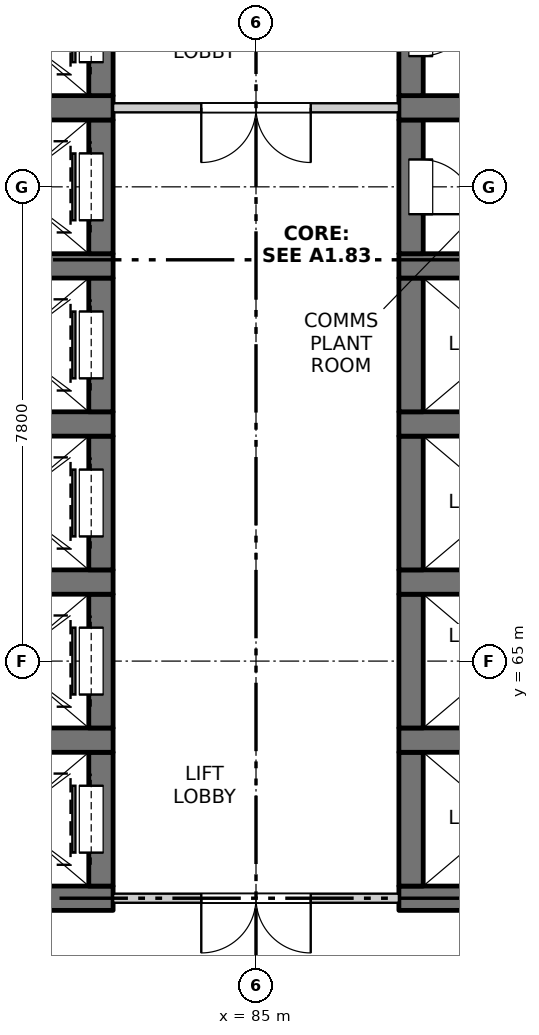
"""IFC4 building model, lengths in metres.
Left out: names, types, materials, properties, quantities, classifications, styles, units other than length and angle.
Written with IfcOpenShell. Run it as: python <this file> out.ifc"""

import sys

from ifc_helpers import new_model, si_unit, direction, frame, frame_2d, origin, place, context, subcontext, project, spatial, rectangle, extrude, element, fill, save


model = new_model("IFC4")
c1 = context("Model", 3, precision=1e-05, world=origin(), true_north=direction((0.0, 1.0)))
c2 = subcontext(c1, "Body", "Model", "MODEL_VIEW")
j1 = project(units=[si_unit("LENGTHUNIT", "METRE"), si_unit("PLANEANGLEUNIT", "RADIAN")], contexts=[c1])
p1 = place(None, origin())
s1 = spatial("IfcSite", under=j1, at=p1, CompositionType="ELEMENT")
p2 = place(p1, origin())
s2 = spatial("IfcBuilding", under=s1, at=p2, CompositionType="ELEMENT")
p3 = place(p2, frame((0.0, 0.0, 95.4)))
s3 = spatial("IfcBuildingStorey", under=s2, at=p3, CompositionType="ELEMENT", Elevation=95.4)
p4 = place(p3, frame((79.65, 61.1, -0.3), z_axis=(0.0, 0.0, 1.0), x_axis=(1.0, 0.0, 0.0)))
e1 = element("IfcWall", 1, at=p4, inside=s3, PredefinedType="SOLIDWALL", context=c2, shape_type="SweptSolid", body=[
    extrude(rectangle(XDim=3.0, YDim=0.4, at=frame_2d((1.5, 0.0))), origin(), (0.0, 0.0, 1.0), 4.5),
])
p5 = place(p3, frame((82.45, 61.3, -0.3), z_axis=(0.0, 0.0, 1.0), x_axis=(0.0, 1.0, 0.0)))
e2 = element("IfcWall", 2, at=p5, inside=s3, PredefinedType="SOLIDWALL", context=c2, shape_type="SweptSolid", body=[
    extrude(rectangle(XDim=2.2, YDim=0.4, at=frame_2d((1.1, 0.0))), origin(), (0.0, 0.0, 1.0), 4.5),
])
p6 = place(p5, frame((0.55, 0.0, 0.3)))
e3 = element("IfcOpeningElement", 3, at=p6, cuts=e2, PredefinedType="OPENING", context=c2, shape_type="SweptSolid", body=[
    extrude(rectangle(XDim=1.1, YDim=2.1, at=frame_2d((0.55, 1.05))), frame((0.0, 0.21, 0.0), z_axis=(0.0, -1.0, 0.0), x_axis=(1.0, 0.0, 0.0)), (0.0, 0.0, 1.0), 0.42),
])
p7 = place(p3, frame((79.65, 63.7, -0.3), z_axis=(0.0, 0.0, 1.0), x_axis=(1.0, 0.0, 0.0)))
e4 = element("IfcWall", 4, at=p7, inside=s3, PredefinedType="SOLIDWALL", context=c2, shape_type="SweptSolid", body=[
    extrude(rectangle(XDim=3.0, YDim=0.4, at=frame_2d((1.5, 0.0))), origin(), (0.0, 0.0, 1.0), 4.5),
])
p8 = place(p3, frame((82.45, 63.9, -0.3), z_axis=(0.0, 0.0, 1.0), x_axis=(0.0, 1.0, 0.0)))
e5 = element("IfcWall", 5, at=p8, inside=s3, PredefinedType="SOLIDWALL", context=c2, shape_type="SweptSolid", body=[
    extrude(rectangle(XDim=2.2, YDim=0.4, at=frame_2d((1.1, 0.0))), origin(), (0.0, 0.0, 1.0), 4.5),
])
p9 = place(p8, frame((0.55, 0.0, 0.3)))
e6 = element("IfcOpeningElement", 6, at=p9, cuts=e5, PredefinedType="OPENING", context=c2, shape_type="SweptSolid", body=[
    extrude(rectangle(XDim=1.1, YDim=2.1, at=frame_2d((0.55, 1.05))), frame((0.0, 0.21, 0.0), z_axis=(0.0, -1.0, 0.0), x_axis=(1.0, 0.0, 0.0)), (0.0, 0.0, 1.0), 0.42),
])
p10 = place(p3, frame((79.65, 66.3, -0.3), z_axis=(0.0, 0.0, 1.0), x_axis=(1.0, 0.0, 0.0)))
e7 = element("IfcWall", 7, at=p10, inside=s3, PredefinedType="SOLIDWALL", context=c2, shape_type="SweptSolid", body=[
    extrude(rectangle(XDim=3.0, YDim=0.4, at=frame_2d((1.5, 0.0))), origin(), (0.0, 0.0, 1.0), 4.5),
])
p11 = place(p3, frame((82.45, 66.5, -0.3), z_axis=(0.0, 0.0, 1.0), x_axis=(0.0, 1.0, 0.0)))
e8 = element("IfcWall", 8, at=p11, inside=s3, PredefinedType="SOLIDWALL", context=c2, shape_type="SweptSolid", body=[
    extrude(rectangle(XDim=2.2, YDim=0.4, at=frame_2d((1.1, 0.0))), origin(), (0.0, 0.0, 1.0), 4.5),
])
p12 = place(p11, frame((0.55, 0.0, 0.3)))
e9 = element("IfcOpeningElement", 9, at=p12, cuts=e8, PredefinedType="OPENING", context=c2, shape_type="SweptSolid", body=[
    extrude(rectangle(XDim=1.1, YDim=2.1, at=frame_2d((0.55, 1.05))), frame((0.0, 0.21, 0.0), z_axis=(0.0, -1.0, 0.0), x_axis=(1.0, 0.0, 0.0)), (0.0, 0.0, 1.0), 0.42),
])
p13 = place(p3, frame((79.65, 68.9, -0.3), z_axis=(0.0, 0.0, 1.0), x_axis=(1.0, 0.0, 0.0)))
e10 = element("IfcWall", 10, at=p13, inside=s3, PredefinedType="SOLIDWALL", context=c2, shape_type="SweptSolid", body=[
    extrude(rectangle(XDim=3.0, YDim=0.4, at=frame_2d((1.5, 0.0))), origin(), (0.0, 0.0, 1.0), 4.5),
])
p14 = place(p3, frame((82.45, 69.1, -0.3), z_axis=(0.0, 0.0, 1.0), x_axis=(0.0, 1.0, 0.0)))
e11 = element("IfcWall", 11, at=p14, inside=s3, PredefinedType="SOLIDWALL", context=c2, shape_type="SweptSolid", body=[
    extrude(rectangle(XDim=2.2, YDim=0.4, at=frame_2d((1.1, 0.0))), origin(), (0.0, 0.0, 1.0), 4.5),
])
p15 = place(p14, frame((0.55, 0.0, 0.3)))
e12 = element("IfcOpeningElement", 12, at=p15, cuts=e11, PredefinedType="OPENING", context=c2, shape_type="SweptSolid", body=[
    extrude(rectangle(XDim=1.1, YDim=2.1, at=frame_2d((0.55, 1.05))), frame((0.0, 0.21, 0.0), z_axis=(0.0, -1.0, 0.0), x_axis=(1.0, 0.0, 0.0)), (0.0, 0.0, 1.0), 0.42),
])
p16 = place(p3, frame((79.65, 71.5, -0.3), z_axis=(0.0, 0.0, 1.0), x_axis=(1.0, 0.0, 0.0)))
e13 = element("IfcWall", 13, at=p16, inside=s3, PredefinedType="SOLIDWALL", context=c2, shape_type="SweptSolid", body=[
    extrude(rectangle(XDim=3.0, YDim=0.4, at=frame_2d((1.5, 0.0))), origin(), (0.0, 0.0, 1.0), 4.5),
])
p17 = place(p3, frame((82.45, 71.7, -0.3), z_axis=(0.0, 0.0, 1.0), x_axis=(0.0, 1.0, 0.0)))
e14 = element("IfcWall", 14, at=p17, inside=s3, PredefinedType="SOLIDWALL", context=c2, shape_type="SweptSolid", body=[
    extrude(rectangle(XDim=2.2, YDim=0.4, at=frame_2d((1.1, 0.0))), origin(), (0.0, 0.0, 1.0), 4.5),
])
p18 = place(p17, frame((0.55, 0.0, 0.3)))
e15 = element("IfcOpeningElement", 15, at=p18, cuts=e14, PredefinedType="OPENING", context=c2, shape_type="SweptSolid", body=[
    extrude(rectangle(XDim=1.1, YDim=2.1, at=frame_2d((0.55, 1.05))), frame((0.0, 0.21, 0.0), z_axis=(0.0, -1.0, 0.0), x_axis=(1.0, 0.0, 0.0)), (0.0, 0.0, 1.0), 0.42),
])
p19 = place(p3, frame((79.65, 74.1, -0.3), z_axis=(0.0, 0.0, 1.0), x_axis=(1.0, 0.0, 0.0)))
e16 = element("IfcWall", 16, at=p19, inside=s3, PredefinedType="SOLIDWALL", context=c2, shape_type="SweptSolid", body=[
    extrude(rectangle(XDim=3.0, YDim=0.4, at=frame_2d((1.5, 0.0))), origin(), (0.0, 0.0, 1.0), 4.5),
])
p20 = place(p3, frame((82.45, 74.3, -0.3), z_axis=(0.0, 0.0, 1.0), x_axis=(0.0, 1.0, 0.0)))
e17 = element("IfcWall", 17, at=p20, inside=s3, PredefinedType="SOLIDWALL", context=c2, shape_type="SweptSolid", body=[
    extrude(rectangle(XDim=2.2, YDim=0.4, at=frame_2d((1.1, 0.0))), origin(), (0.0, 0.0, 1.0), 4.5),
])
p21 = place(p20, frame((0.55, 0.0, 0.3)))
e18 = element("IfcOpeningElement", 18, at=p21, cuts=e17, PredefinedType="OPENING", context=c2, shape_type="SweptSolid", body=[
    extrude(rectangle(XDim=1.1, YDim=2.1, at=frame_2d((0.55, 1.05))), frame((0.0, 0.21, 0.0), z_axis=(0.0, -1.0, 0.0), x_axis=(1.0, 0.0, 0.0)), (0.0, 0.0, 1.0), 0.42),
])
p22 = place(p3, frame((87.35, 61.1, -0.3), z_axis=(0.0, 0.0, 1.0), x_axis=(1.0, 0.0, 0.0)))
e19 = element("IfcWall", 19, at=p22, inside=s3, PredefinedType="SOLIDWALL", context=c2, shape_type="SweptSolid", body=[
    extrude(rectangle(XDim=3.0, YDim=0.4, at=frame_2d((1.5, 0.0))), origin(), (0.0, 0.0, 1.0), 4.5),
])
p23 = place(p3, frame((87.55, 61.3, -0.3), z_axis=(0.0, 0.0, 1.0), x_axis=(0.0, 1.0, 0.0)))
e20 = element("IfcWall", 20, at=p23, inside=s3, PredefinedType="SOLIDWALL", context=c2, shape_type="SweptSolid", body=[
    extrude(rectangle(XDim=2.2, YDim=0.4, at=frame_2d((1.1, 0.0))), origin(), (0.0, 0.0, 1.0), 4.5),
])
p24 = place(p3, frame((87.35, 63.7, -0.3), z_axis=(0.0, 0.0, 1.0), x_axis=(1.0, 0.0, 0.0)))
e21 = element("IfcWall", 21, at=p24, inside=s3, PredefinedType="SOLIDWALL", context=c2, shape_type="SweptSolid", body=[
    extrude(rectangle(XDim=3.0, YDim=0.4, at=frame_2d((1.5, 0.0))), origin(), (0.0, 0.0, 1.0), 4.5),
])
p25 = place(p3, frame((87.55, 63.9, -0.3), z_axis=(0.0, 0.0, 1.0), x_axis=(0.0, 1.0, 0.0)))
e22 = element("IfcWall", 22, at=p25, inside=s3, PredefinedType="SOLIDWALL", context=c2, shape_type="SweptSolid", body=[
    extrude(rectangle(XDim=2.2, YDim=0.4, at=frame_2d((1.1, 0.0))), origin(), (0.0, 0.0, 1.0), 4.5),
])
p26 = place(p3, frame((87.35, 66.3, -0.3), z_axis=(0.0, 0.0, 1.0), x_axis=(1.0, 0.0, 0.0)))
e23 = element("IfcWall", 23, at=p26, inside=s3, PredefinedType="SOLIDWALL", context=c2, shape_type="SweptSolid", body=[
    extrude(rectangle(XDim=3.0, YDim=0.4, at=frame_2d((1.5, 0.0))), origin(), (0.0, 0.0, 1.0), 4.5),
])
p27 = place(p3, frame((87.55, 66.5, -0.3), z_axis=(0.0, 0.0, 1.0), x_axis=(0.0, 1.0, 0.0)))
e24 = element("IfcWall", 24, at=p27, inside=s3, PredefinedType="SOLIDWALL", context=c2, shape_type="SweptSolid", body=[
    extrude(rectangle(XDim=2.2, YDim=0.4, at=frame_2d((1.1, 0.0))), origin(), (0.0, 0.0, 1.0), 4.5),
])
p28 = place(p3, frame((87.35, 68.9, -0.3), z_axis=(0.0, 0.0, 1.0), x_axis=(1.0, 0.0, 0.0)))
e25 = element("IfcWall", 25, at=p28, inside=s3, PredefinedType="SOLIDWALL", context=c2, shape_type="SweptSolid", body=[
    extrude(rectangle(XDim=3.0, YDim=0.4, at=frame_2d((1.5, 0.0))), origin(), (0.0, 0.0, 1.0), 4.5),
])
p29 = place(p3, frame((87.55, 69.1, -0.3), z_axis=(0.0, 0.0, 1.0), x_axis=(0.0, 1.0, 0.0)))
e26 = element("IfcWall", 26, at=p29, inside=s3, PredefinedType="SOLIDWALL", context=c2, shape_type="SweptSolid", body=[
    extrude(rectangle(XDim=2.2, YDim=0.4, at=frame_2d((1.1, 0.0))), origin(), (0.0, 0.0, 1.0), 4.5),
])
p30 = place(p3, frame((87.35, 71.5, -0.3), z_axis=(0.0, 0.0, 1.0), x_axis=(1.0, 0.0, 0.0)))
e27 = element("IfcWall", 27, at=p30, inside=s3, PredefinedType="SOLIDWALL", context=c2, shape_type="SweptSolid", body=[
    extrude(rectangle(XDim=3.0, YDim=0.4, at=frame_2d((1.5, 0.0))), origin(), (0.0, 0.0, 1.0), 4.5),
])
p31 = place(p3, frame((87.55, 71.7, -0.3), z_axis=(0.0, 0.0, 1.0), x_axis=(0.0, 1.0, 0.0)))
e28 = element("IfcWall", 28, at=p31, inside=s3, PredefinedType="SOLIDWALL", context=c2, shape_type="SweptSolid", body=[
    extrude(rectangle(XDim=2.2, YDim=0.4, at=frame_2d((1.1, 0.0))), origin(), (0.0, 0.0, 1.0), 4.5),
])
p32 = place(p31, frame((0.65, 0.0, 0.3)))
e29 = element("IfcOpeningElement", 29, at=p32, cuts=e28, PredefinedType="OPENING", context=c2, shape_type="SweptSolid", body=[
    extrude(rectangle(XDim=0.9, YDim=2.1, at=frame_2d((0.45, 1.05))), frame((0.0, 0.21, 0.0), z_axis=(0.0, -1.0, 0.0), x_axis=(1.0, 0.0, 0.0)), (0.0, 0.0, 1.0), 0.42),
])
p33 = place(p3, frame((87.35, 74.1, -0.3), z_axis=(0.0, 0.0, 1.0), x_axis=(1.0, 0.0, 0.0)))
e30 = element("IfcWall", 30, at=p33, inside=s3, PredefinedType="SOLIDWALL", context=c2, shape_type="SweptSolid", body=[
    extrude(rectangle(XDim=3.0, YDim=0.4, at=frame_2d((1.5, 0.0))), origin(), (0.0, 0.0, 1.0), 4.5),
])
p34 = place(p3, frame((87.55, 74.3, -0.3), z_axis=(0.0, 0.0, 1.0), x_axis=(0.0, 1.0, 0.0)))
e31 = element("IfcWall", 31, at=p34, inside=s3, PredefinedType="SOLIDWALL", context=c2, shape_type="SweptSolid", body=[
    extrude(rectangle(XDim=2.2, YDim=0.4, at=frame_2d((1.1, 0.0))), origin(), (0.0, 0.0, 1.0), 4.5),
])
p35 = place(p34, frame((0.65, 0.0, 0.3)))
e32 = element("IfcOpeningElement", 32, at=p35, cuts=e31, PredefinedType="OPENING", context=c2, shape_type="SweptSolid", body=[
    extrude(rectangle(XDim=0.9, YDim=2.1, at=frame_2d((0.45, 1.05))), frame((0.0, 0.21, 0.0), z_axis=(0.0, -1.0, 0.0), x_axis=(1.0, 0.0, 0.0)), (0.0, 0.0, 1.0), 0.42),
])
p36 = place(p3, frame((82.65, 61.1, 0.0), z_axis=(0.0, 0.0, 1.0), x_axis=(1.0, 0.0, 0.0)))
e33 = element("IfcWall", 33, at=p36, inside=s3, PredefinedType="PARTITIONING", context=c2, shape_type="SweptSolid", body=[
    extrude(rectangle(XDim=4.7, YDim=0.15, at=frame_2d((2.35, 0.0))), origin(), (0.0, 0.0, 1.0), 4.2),
])
p37 = place(p36, frame((1.45, 0.0, 0.0)))
e34 = element("IfcOpeningElement", 34, at=p37, cuts=e33, PredefinedType="OPENING", context=c2, shape_type="SweptSolid", body=[
    extrude(rectangle(XDim=1.8, YDim=2.1, at=frame_2d((0.9, 1.05))), frame((0.0, 0.085, 0.0), z_axis=(0.0, -1.0, 0.0), x_axis=(1.0, 0.0, 0.0)), (0.0, 0.0, 1.0), 0.17),
])
p38 = place(p3, frame((82.65, 74.1, 0.0), z_axis=(0.0, 0.0, 1.0), x_axis=(1.0, 0.0, 0.0)))
e35 = element("IfcWall", 35, at=p38, inside=s3, PredefinedType="PARTITIONING", context=c2, shape_type="SweptSolid", body=[
    extrude(rectangle(XDim=4.7, YDim=0.15, at=frame_2d((2.35, 0.0))), origin(), (0.0, 0.0, 1.0), 4.2),
])
p39 = place(p38, frame((1.45, 0.0, 0.0)))
e36 = element("IfcOpeningElement", 36, at=p39, cuts=e35, PredefinedType="OPENING", context=c2, shape_type="SweptSolid", body=[
    extrude(rectangle(XDim=1.8, YDim=2.1, at=frame_2d((0.9, 1.05))), frame((0.0, 0.085, 0.0), z_axis=(0.0, -1.0, 0.0), x_axis=(1.0, 0.0, 0.0)), (0.0, 0.0, 1.0), 0.17),
])
p40 = place(p37, origin())
e37 = element("IfcDoor", 37, at=p40, inside=s3, OperationType="DOUBLE_DOOR_SINGLE_SWING", PredefinedType="DOOR", context=c2, shape_type="SweptSolid", body=[
    extrude(rectangle(XDim=1.8, YDim=2.1, at=frame_2d((0.9, 1.05))), frame((0.0, 0.025, 0.0), z_axis=(0.0, -1.0, 0.0), x_axis=(1.0, 0.0, 0.0)), (0.0, 0.0, 1.0), 0.05),
])
fill(e34, e37)
p41 = place(p6, origin())
e38 = element("IfcDoor", 38, at=p41, inside=s3, OperationType="SLIDING_TO_RIGHT", PredefinedType="DOOR", context=c2, shape_type="SweptSolid", body=[
    extrude(rectangle(XDim=1.1, YDim=2.1, at=frame_2d((0.55, 1.05))), frame((0.0, 0.185, 0.0), z_axis=(0.0, -1.0, 0.0), x_axis=(1.0, 0.0, 0.0)), (0.0, 0.0, 1.0), 0.05),
])
fill(e3, e38)
p42 = place(p9, origin())
e39 = element("IfcDoor", 39, at=p42, inside=s3, OperationType="SLIDING_TO_RIGHT", PredefinedType="DOOR", context=c2, shape_type="SweptSolid", body=[
    extrude(rectangle(XDim=1.1, YDim=2.1, at=frame_2d((0.55, 1.05))), frame((0.0, 0.185, 0.0), z_axis=(0.0, -1.0, 0.0), x_axis=(1.0, 0.0, 0.0)), (0.0, 0.0, 1.0), 0.05),
])
fill(e6, e39)
p43 = place(p12, origin())
e40 = element("IfcDoor", 40, at=p43, inside=s3, OperationType="SLIDING_TO_RIGHT", PredefinedType="DOOR", context=c2, shape_type="SweptSolid", body=[
    extrude(rectangle(XDim=1.1, YDim=2.1, at=frame_2d((0.55, 1.05))), frame((0.0, 0.185, 0.0), z_axis=(0.0, -1.0, 0.0), x_axis=(1.0, 0.0, 0.0)), (0.0, 0.0, 1.0), 0.05),
])
fill(e9, e40)
p44 = place(p15, origin())
e41 = element("IfcDoor", 41, at=p44, inside=s3, OperationType="SLIDING_TO_LEFT", PredefinedType="DOOR", context=c2, shape_type="SweptSolid", body=[
    extrude(rectangle(XDim=1.1, YDim=2.1, at=frame_2d((0.55, 1.05))), frame((0.0, 0.185, 0.0), z_axis=(0.0, -1.0, 0.0), x_axis=(1.0, 0.0, 0.0)), (0.0, 0.0, 1.0), 0.05),
])
fill(e12, e41)
p45 = place(p18, origin())
e42 = element("IfcDoor", 42, at=p45, inside=s3, OperationType="SLIDING_TO_LEFT", PredefinedType="DOOR", context=c2, shape_type="SweptSolid", body=[
    extrude(rectangle(XDim=1.1, YDim=2.1, at=frame_2d((0.55, 1.05))), frame((0.0, 0.185, 0.0), z_axis=(0.0, -1.0, 0.0), x_axis=(1.0, 0.0, 0.0)), (0.0, 0.0, 1.0), 0.05),
])
fill(e15, e42)
p46 = place(p32, origin())
e43 = element("IfcDoor", 43, at=p46, inside=s3, OperationType="SINGLE_SWING_RIGHT", PredefinedType="DOOR", context=c2, shape_type="SweptSolid", body=[
    extrude(rectangle(XDim=0.9, YDim=2.1, at=frame_2d((0.45, 1.05))), frame((0.0, -0.135, 0.0), z_axis=(0.0, -1.0, 0.0), x_axis=(1.0, 0.0, 0.0)), (0.0, 0.0, 1.0), 0.05),
])
fill(e29, e43)
p47 = place(p39, origin())
e44 = element("IfcDoor", 44, at=p47, inside=s3, OperationType="DOUBLE_DOOR_SINGLE_SWING", PredefinedType="DOOR", context=c2, shape_type="SweptSolid", body=[
    extrude(rectangle(XDim=1.8, YDim=2.1, at=frame_2d((0.9, 1.05))), frame((0.0, 0.025, 0.0), z_axis=(0.0, -1.0, 0.0), x_axis=(1.0, 0.0, 0.0)), (0.0, 0.0, 1.0), 0.05),
])
fill(e36, e44)
p48 = place(p21, origin())
e45 = element("IfcDoor", 45, at=p48, inside=s3, OperationType="SLIDING_TO_LEFT", PredefinedType="DOOR", context=c2, shape_type="SweptSolid", body=[
    extrude(rectangle(XDim=1.1, YDim=2.1, at=frame_2d((0.55, 1.05))), frame((0.0, 0.185, 0.0), z_axis=(0.0, -1.0, 0.0), x_axis=(1.0, 0.0, 0.0)), (0.0, 0.0, 1.0), 0.05),
])
fill(e18, e45)
p49 = place(p35, origin())
e46 = element("IfcDoor", 46, at=p49, inside=s3, OperationType="SINGLE_SWING_LEFT", PredefinedType="DOOR", context=c2, shape_type="SweptSolid", body=[
    extrude(rectangle(XDim=0.9, YDim=2.1, at=frame_2d((0.45, 1.05))), frame((0.0, -0.135, 0.0), z_axis=(0.0, -1.0, 0.0), x_axis=(1.0, 0.0, 0.0)), (0.0, 0.0, 1.0), 0.05),
])
fill(e32, e46)
save(model, sys.argv[1])
